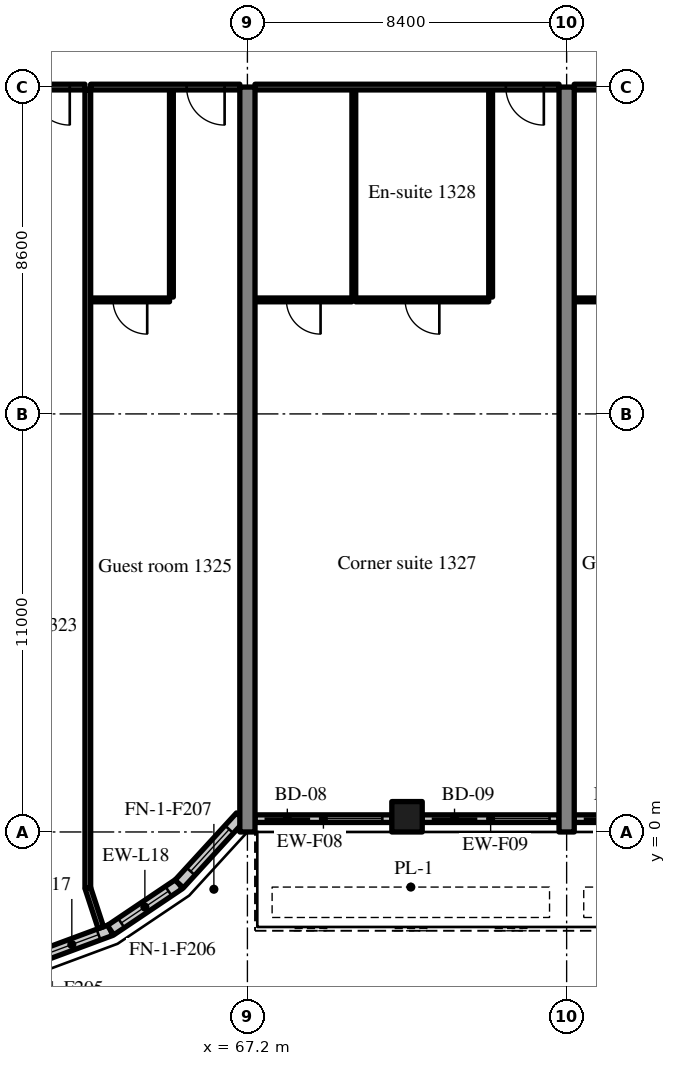
"""IFC4 building model, lengths in metres.
Left out: names, types, materials, properties, quantities, classifications, styles, units other than length and angle.
Written with IfcOpenShell. Run it as: python <this file> out.ifc"""

import sys

from ifc_helpers import new_model, si_unit, direction, frame, frame_2d, origin, origin_2d, place, context, subcontext, project, spatial, rectangle, extrude, source, transform, mapped, element, fill, save


model = new_model("IFC4")
c1 = context("Model", 3, precision=1e-05, world=origin(), true_north=direction((0.0, 1.0)))
c2 = subcontext(c1, "Body", "Model", "MODEL_VIEW")
j1 = project(units=[si_unit("LENGTHUNIT", "METRE"), si_unit("PLANEANGLEUNIT", "RADIAN")], contexts=[c1])
p1 = place(None, origin())
s1 = spatial("IfcSite", under=j1, at=p1, CompositionType="ELEMENT")
p2 = place(p1, origin())
s2 = spatial("IfcBuilding", under=s1, at=p2, CompositionType="ELEMENT")
p3 = place(p2, frame((0.0, 0.0, 58.2)))
s3 = spatial("IfcBuildingStorey", under=s2, at=p3, CompositionType="ELEMENT", Elevation=58.2)
m1 = source(origin(), c2, "Body", "SweptSolid", [
    extrude(rectangle(XDim=19.6, YDim=0.4, at=frame_2d((9.8, 0.0))), origin(), (0.0, 0.0, 1.0), 3.52),
])
for number, where, z_axis, x_axis in (
    (1, (67.2, 0.0, 0.0), (0.0, 0.0, 1.0), (0.0, 1.0, 0.0)),
    (2, (75.6, 0.0, 0.0), (0.0, 0.0, 1.0), (0.0, 1.0, 0.0)),
):
    element("IfcWall", number, at=place(p3, frame(where, z_axis=z_axis, x_axis=x_axis)), inside=s3, PredefinedType="SHEAR", context=c2, shape_type="MappedRepresentation", body=[
        mapped(m1, transform((0.0, 0.0, 0.0), scale=1.0)),
    ])
m2 = source(origin(), c2, "Body", "SweptSolid", [
    extrude(rectangle(XDim=0.8, YDim=0.8, at=origin_2d()), origin(), (0.0, 0.0, 1.0), 3.52),
])
p4 = place(p3, frame((71.4, 0.4, 0.0), z_axis=(0.0, 0.0, 1.0), x_axis=(1.0, 0.0, 0.0)))
e3 = element("IfcColumn", 3, at=p4, inside=s3, PredefinedType="COLUMN", context=c2, shape_type="MappedRepresentation", body=[
    mapped(m2, transform((0.0, 0.0, 0.0), scale=1.0)),
])
m3 = source(origin(), c2, "Body", "SweptSolid", [
    extrude(rectangle(XDim=2.176, YDim=0.3, at=frame_2d((1.088, 0.0))), origin(), (0.0, 0.0, 1.0), 3.52),
])
p5 = place(p3, frame((61.56, -3.34, 0.0), z_axis=(0.0, 0.0, 1.0), x_axis=(0.937531979054, 0.347899106424, 0.0)))
e4 = element("IfcWall", 4, at=p5, inside=s3, PredefinedType="SOLIDWALL", context=c2, shape_type="MappedRepresentation", body=[
    mapped(m3, transform((0.0, 0.0, 0.0), scale=1.0)),
])
m4 = source(origin(), c2, "Body", "SweptSolid", [
    extrude(rectangle(XDim=1.5, YDim=2.0, at=frame_2d((0.75, 1.0))), frame((0.0, 0.16, 0.0), z_axis=(0.0, -1.0, 0.0), x_axis=(1.0, 0.0, 0.0)), (0.0, 0.0, 1.0), 0.32),
])
p6 = place(p5, frame((0.338, 0.0, 0.9)))
e5 = element("IfcOpeningElement", 5, at=p6, cuts=e4, PredefinedType="OPENING", context=c2, shape_type="MappedRepresentation", body=[
    mapped(m4, transform((0.0, 0.0, 0.0), scale=1.0)),
])
m5 = source(origin(), c2, "Body", "SweptSolid", [
    extrude(rectangle(XDim=2.176, YDim=0.3, at=frame_2d((1.088, 0.0))), origin(), (0.0, 0.0, 1.0), 3.52),
])
p7 = place(p3, frame((63.599, -2.583, 0.0), z_axis=(0.0, 0.0, 1.0), x_axis=(0.829625727223, 0.558319937607, 0.0)))
e6 = element("IfcWall", 6, at=p7, inside=s3, PredefinedType="SOLIDWALL", context=c2, shape_type="MappedRepresentation", body=[
    mapped(m5, transform((0.0, 0.0, 0.0), scale=1.0)),
])
p8 = place(p7, frame((0.338, 0.0, 0.9)))
e7 = element("IfcOpeningElement", 7, at=p8, cuts=e6, PredefinedType="OPENING", context=c2, shape_type="MappedRepresentation", body=[
    mapped(m4, transform((0.0, 0.0, 0.0), scale=1.0)),
])
m6 = source(origin(), c2, "Body", "SweptSolid", [
    extrude(rectangle(XDim=2.398, YDim=0.3, at=frame_2d((1.199, 0.0))), origin(), (0.0, 0.0, 1.0), 3.52),
])
p9 = place(p3, frame((65.404, -1.369, 0.0), z_axis=(0.0, 0.0, 1.0), x_axis=(0.675374189419, 0.737475222815, 0.0)))
e8 = element("IfcWall", 8, at=p9, inside=s3, PredefinedType="SOLIDWALL", context=c2, shape_type="MappedRepresentation", body=[
    mapped(m6, transform((0.0, 0.0, 0.0), scale=1.0)),
])
p10 = place(p9, frame((0.449, 0.0, 0.9)))
e9 = element("IfcOpeningElement", 9, at=p10, cuts=e8, PredefinedType="OPENING", context=c2, shape_type="MappedRepresentation", body=[
    mapped(m4, transform((0.0, 0.0, 0.0), scale=1.0)),
])
m7 = source(origin(), c2, "Body", "SweptSolid", [
    extrude(rectangle(XDim=3.6, YDim=0.2, at=frame_2d((1.8, 0.0))), origin(), (0.0, 0.0, 1.0), 2.82),
])
p11 = place(p3, frame((67.4, 0.35, 0.0), z_axis=(0.0, 0.0, 1.0), x_axis=(1.0, 0.0, 0.0)))
e10 = element("IfcWall", 10, at=p11, inside=s3, PredefinedType="SOLIDWALL", context=c2, shape_type="MappedRepresentation", body=[
    mapped(m7, transform((0.0, 0.0, 0.0), scale=1.0)),
])
m8 = source(origin(), c2, "Body", "SweptSolid", [
    extrude(rectangle(XDim=1.2, YDim=2.4, at=frame_2d((0.6, 1.2))), frame((0.0, 0.11, 0.0), z_axis=(0.0, -1.0, 0.0), x_axis=(1.0, 0.0, 0.0)), (0.0, 0.0, 1.0), 0.22),
])
p12 = place(p11, frame((0.25, 0.0, 0.0)))
e11 = element("IfcOpeningElement", 11, at=p12, cuts=e10, PredefinedType="OPENING", context=c2, shape_type="MappedRepresentation", body=[
    mapped(m8, transform((0.0, 0.0, 0.0), scale=1.0)),
])
m9 = source(origin(), c2, "Body", "SweptSolid", [
    extrude(rectangle(XDim=1.5, YDim=1.5, at=frame_2d((0.75, 0.75))), frame((0.0, 0.11, 0.0), z_axis=(0.0, -1.0, 0.0), x_axis=(1.0, 0.0, 0.0)), (0.0, 0.0, 1.0), 0.22),
])
p13 = place(p11, frame((1.85, 0.0, 0.9)))
e12 = element("IfcOpeningElement", 12, at=p13, cuts=e10, PredefinedType="OPENING", context=c2, shape_type="MappedRepresentation", body=[
    mapped(m9, transform((0.0, 0.0, 0.0), scale=1.0)),
])
m10 = source(origin(), c2, "Body", "SweptSolid", [
    extrude(rectangle(XDim=3.6, YDim=0.2, at=frame_2d((1.8, 0.0))), origin(), (0.0, 0.0, 1.0), 2.82),
])
p14 = place(p3, frame((71.8, 0.35, 0.0), z_axis=(0.0, 0.0, 1.0), x_axis=(1.0, 0.0, 0.0)))
e13 = element("IfcWall", 13, at=p14, inside=s3, PredefinedType="SOLIDWALL", context=c2, shape_type="MappedRepresentation", body=[
    mapped(m10, transform((0.0, 0.0, 0.0), scale=1.0)),
])
p15 = place(p14, frame((0.25, 0.0, 0.0)))
e14 = element("IfcOpeningElement", 14, at=p15, cuts=e13, PredefinedType="OPENING", context=c2, shape_type="MappedRepresentation", body=[
    mapped(m8, transform((0.0, 0.0, 0.0), scale=1.0)),
])
p16 = place(p14, frame((1.85, 0.0, 0.9)))
e15 = element("IfcOpeningElement", 15, at=p16, cuts=e13, PredefinedType="OPENING", context=c2, shape_type="MappedRepresentation", body=[
    mapped(m9, transform((0.0, 0.0, 0.0), scale=1.0)),
])
p17 = place(p3, frame((75.8, 0.35, 0.0), z_axis=(0.0, 0.0, 1.0), x_axis=(1.0, 0.0, 0.0)))
e16 = element("IfcWall", 16, at=p17, inside=s3, PredefinedType="SOLIDWALL", context=c2, shape_type="MappedRepresentation", body=[
    mapped(m10, transform((0.0, 0.0, 0.0), scale=1.0)),
])
p18 = place(p17, frame((0.25, 0.0, 0.0)))
e17 = element("IfcOpeningElement", 17, at=p18, cuts=e16, PredefinedType="OPENING", context=c2, shape_type="MappedRepresentation", body=[
    mapped(m8, transform((0.0, 0.0, 0.0), scale=1.0)),
])
p19 = place(p17, frame((1.85, 0.0, 0.9)))
e18 = element("IfcOpeningElement", 18, at=p19, cuts=e16, PredefinedType="OPENING", context=c2, shape_type="MappedRepresentation", body=[
    mapped(m9, transform((0.0, 0.0, 0.0), scale=1.0)),
])
m11 = source(origin(), c2, "Body", "SweptSolid", [
    extrude(rectangle(XDim=3.925, YDim=0.15, at=frame_2d((1.962, 0.0))), origin(), (0.0, 0.0, 1.0), 2.82),
])
p20 = place(p3, frame((59.0, 19.6, 0.0), z_axis=(0.0, 0.0, 1.0), x_axis=(1.0, 0.0, 0.0)))
e19 = element("IfcWall", 19, at=p20, inside=s3, PredefinedType="PARTITIONING", context=c2, shape_type="MappedRepresentation", body=[
    mapped(m11, transform((0.0, 0.0, 0.0), scale=1.0)),
])
m12 = source(origin(), c2, "Body", "SweptSolid", [
    extrude(rectangle(XDim=1.0, YDim=2.1, at=frame_2d((0.5, 1.05))), frame((0.0, 0.085, 0.0), z_axis=(0.0, -1.0, 0.0), x_axis=(1.0, 0.0, 0.0)), (0.0, 0.0, 1.0), 0.17),
])
p21 = place(p20, frame((2.525, 0.0, 0.0)))
e20 = element("IfcOpeningElement", 20, at=p21, cuts=e19, PredefinedType="OPENING", context=c2, shape_type="MappedRepresentation", body=[
    mapped(m12, transform((0.0, 0.0, 0.0), scale=1.0)),
])
m13 = source(origin(), c2, "Body", "SweptSolid", [
    extrude(rectangle(XDim=5.45, YDim=0.1, at=frame_2d((2.725, 0.0))), origin(), (0.0, 0.0, 1.0), 3.52),
])
p22 = place(p3, frame((65.2, 14.075, 0.0), z_axis=(0.0, 0.0, 1.0), x_axis=(0.0, 1.0, 0.0)))
e21 = element("IfcWall", 21, at=p22, inside=s3, PredefinedType="PARTITIONING", context=c2, shape_type="MappedRepresentation", body=[
    mapped(m13, transform((0.0, 0.0, 0.0), scale=1.0)),
])
m14 = source(origin(), c2, "Body", "SweptSolid", [
    extrude(rectangle(XDim=2.075, YDim=0.1, at=frame_2d((1.038, 0.0))), origin(), (0.0, 0.0, 1.0), 3.52),
])
p23 = place(p3, frame((63.075, 14.0, 0.0), z_axis=(0.0, 0.0, 1.0), x_axis=(1.0, 0.0, 0.0)))
e22 = element("IfcWall", 22, at=p23, inside=s3, PredefinedType="PARTITIONING", context=c2, shape_type="MappedRepresentation", body=[
    mapped(m14, transform((0.0, 0.0, 0.0), scale=1.0)),
])
m15 = source(origin(), c2, "Body", "SweptSolid", [
    extrude(rectangle(XDim=0.9, YDim=2.1, at=frame_2d((0.45, 1.05))), frame((0.0, 0.06, 0.0), z_axis=(0.0, -1.0, 0.0), x_axis=(1.0, 0.0, 0.0)), (0.0, 0.0, 1.0), 0.12),
])
p24 = place(p23, frame((0.588, 0.0, 0.0)))
e23 = element("IfcOpeningElement", 23, at=p24, cuts=e22, PredefinedType="OPENING", context=c2, shape_type="MappedRepresentation", body=[
    mapped(m15, transform((0.0, 0.0, 0.0), scale=1.0)),
])
p25 = place(p3, frame((63.075, 19.6, 0.0), z_axis=(0.0, 0.0, 1.0), x_axis=(1.0, 0.0, 0.0)))
e24 = element("IfcWall", 24, at=p25, inside=s3, PredefinedType="PARTITIONING", context=c2, shape_type="MappedRepresentation", body=[
    mapped(m11, transform((0.0, 0.0, 0.0), scale=1.0)),
])
p26 = place(p25, frame((2.525, 0.0, 0.0)))
e25 = element("IfcOpeningElement", 25, at=p26, cuts=e24, PredefinedType="OPENING", context=c2, shape_type="MappedRepresentation", body=[
    mapped(m12, transform((0.0, 0.0, 0.0), scale=1.0)),
])
m16 = source(origin(), c2, "Body", "SweptSolid", [
    extrude(rectangle(XDim=20.998, YDim=0.15, at=frame_2d((10.499, 0.0))), origin(), (0.0, 0.0, 1.0), 3.52),
])
p27 = place(p3, frame((63.0, -1.473, 0.0), z_axis=(0.0, 0.0, 1.0), x_axis=(0.0, 1.0, 0.0)))
e26 = element("IfcWall", 26, at=p27, inside=s3, PredefinedType="PARTITIONING", context=c2, shape_type="MappedRepresentation", body=[
    mapped(m16, transform((0.0, 0.0, 0.0), scale=1.0)),
])
for number, where, z_axis, x_axis in (
    (27, (73.6, 14.075, 0.0), (0.0, 0.0, 1.0), (0.0, 1.0, 0.0)),
    (28, (70.0, 14.075, 0.0), (0.0, 0.0, 1.0), (0.0, 1.0, 0.0)),
):
    element("IfcWall", number, at=place(p3, frame(where, z_axis=z_axis, x_axis=x_axis)), inside=s3, PredefinedType="PARTITIONING", context=c2, shape_type="MappedRepresentation", body=[
        mapped(m13, transform((0.0, 0.0, 0.0), scale=1.0)),
    ])
m17 = source(origin(), c2, "Body", "SweptSolid", [
    extrude(rectangle(XDim=3.5, YDim=0.1, at=frame_2d((1.75, 0.0))), origin(), (0.0, 0.0, 1.0), 3.52),
])
p28 = place(p3, frame((70.05, 14.0, 0.0), z_axis=(0.0, 0.0, 1.0), x_axis=(1.0, 0.0, 0.0)))
e29 = element("IfcWall", 29, at=p28, inside=s3, PredefinedType="PARTITIONING", context=c2, shape_type="MappedRepresentation", body=[
    mapped(m17, transform((0.0, 0.0, 0.0), scale=1.0)),
])
p29 = place(p28, frame((1.3, 0.0, 0.0)))
e30 = element("IfcOpeningElement", 30, at=p29, cuts=e29, PredefinedType="OPENING", context=c2, shape_type="MappedRepresentation", body=[
    mapped(m15, transform((0.0, 0.0, 0.0), scale=1.0)),
])
m18 = source(origin(), c2, "Body", "SweptSolid", [
    extrude(rectangle(XDim=2.55, YDim=0.1, at=frame_2d((1.275, 0.0))), origin(), (0.0, 0.0, 1.0), 3.52),
])
p30 = place(p3, frame((67.4, 14.0, 0.0), z_axis=(0.0, 0.0, 1.0), x_axis=(1.0, 0.0, 0.0)))
e31 = element("IfcWall", 31, at=p30, inside=s3, PredefinedType="PARTITIONING", context=c2, shape_type="MappedRepresentation", body=[
    mapped(m18, transform((0.0, 0.0, 0.0), scale=1.0)),
])
p31 = place(p30, frame((0.825, 0.0, 0.0)))
e32 = element("IfcOpeningElement", 32, at=p31, cuts=e31, PredefinedType="OPENING", context=c2, shape_type="MappedRepresentation", body=[
    mapped(m15, transform((0.0, 0.0, 0.0), scale=1.0)),
])
m19 = source(origin(), c2, "Body", "SweptSolid", [
    extrude(rectangle(XDim=8.0, YDim=0.15, at=frame_2d((4.0, 0.0))), origin(), (0.0, 0.0, 1.0), 2.82),
])
p32 = place(p3, frame((67.4, 19.6, 0.0), z_axis=(0.0, 0.0, 1.0), x_axis=(1.0, 0.0, 0.0)))
e33 = element("IfcWall", 33, at=p32, inside=s3, PredefinedType="PARTITIONING", context=c2, shape_type="MappedRepresentation", body=[
    mapped(m19, transform((0.0, 0.0, 0.0), scale=1.0)),
])
p33 = place(p32, frame((6.6, 0.0, 0.0)))
e34 = element("IfcOpeningElement", 34, at=p33, cuts=e33, PredefinedType="OPENING", context=c2, shape_type="MappedRepresentation", body=[
    mapped(m12, transform((0.0, 0.0, 0.0), scale=1.0)),
])
p34 = place(p3, frame((75.8, 14.0, 0.0), z_axis=(0.0, 0.0, 1.0), x_axis=(1.0, 0.0, 0.0)))
e35 = element("IfcWall", 35, at=p34, inside=s3, PredefinedType="PARTITIONING", context=c2, shape_type="MappedRepresentation", body=[
    mapped(m14, transform((0.0, 0.0, 0.0), scale=1.0)),
])
p35 = place(p34, frame((0.588, 0.0, 0.0)))
e36 = element("IfcOpeningElement", 36, at=p35, cuts=e35, PredefinedType="OPENING", context=c2, shape_type="MappedRepresentation", body=[
    mapped(m15, transform((0.0, 0.0, 0.0), scale=1.0)),
])
p36 = place(p3, frame((75.8, 19.6, 0.0), z_axis=(0.0, 0.0, 1.0), x_axis=(1.0, 0.0, 0.0)))
e37 = element("IfcWall", 37, at=p36, inside=s3, PredefinedType="PARTITIONING", context=c2, shape_type="MappedRepresentation", body=[
    mapped(m11, transform((0.0, 0.0, 0.0), scale=1.0)),
])
p37 = place(p36, frame((2.525, 0.0, 0.0)))
e38 = element("IfcOpeningElement", 38, at=p37, cuts=e37, PredefinedType="OPENING", context=c2, shape_type="MappedRepresentation", body=[
    mapped(m12, transform((0.0, 0.0, 0.0), scale=1.0)),
])
m20 = source(origin(), c2, "Body", "SweptSolid", [
    extrude(rectangle(XDim=1.101, YDim=0.15, at=frame_2d((0.55, 0.0))), origin(), (0.0, 0.0, 1.0), 3.52),
])
p38 = place(p3, frame((63.343, -2.519, 0.0), z_axis=(0.0, 0.0, 1.0), x_axis=(-0.311567081539, 0.950224159712, 0.0)))
e39 = element("IfcWall", 39, at=p38, inside=s3, PredefinedType="PARTITIONING", context=c2, shape_type="MappedRepresentation", body=[
    mapped(m20, transform((0.0, 0.0, 0.0), scale=1.0)),
])
m21 = source(origin(), c2, "Body", "SweptSolid", [
    extrude(rectangle(XDim=1.5, YDim=2.0, at=frame_2d((0.75, 1.0))), frame((0.0, 0.03, 0.0), z_axis=(0.0, -1.0, 0.0), x_axis=(1.0, 0.0, 0.0)), (0.0, 0.0, 1.0), 0.06),
])
p39 = place(p6, origin())
e40 = element("IfcWindow", 40, at=p39, inside=s3, PartitioningType="SINGLE_PANEL", PredefinedType="WINDOW", context=c2, shape_type="MappedRepresentation", body=[
    mapped(m21, transform((0.0, 0.0, 0.0), scale=1.0)),
])
fill(e5, e40)
p40 = place(p8, origin())
e41 = element("IfcWindow", 41, at=p40, inside=s3, PartitioningType="SINGLE_PANEL", PredefinedType="WINDOW", context=c2, shape_type="MappedRepresentation", body=[
    mapped(m21, transform((0.0, 0.0, 0.0), scale=1.0)),
])
fill(e7, e41)
p41 = place(p10, origin())
e42 = element("IfcWindow", 42, at=p41, inside=s3, PartitioningType="SINGLE_PANEL", PredefinedType="WINDOW", context=c2, shape_type="MappedRepresentation", body=[
    mapped(m21, transform((0.0, 0.0, 0.0), scale=1.0)),
])
fill(e9, e42)
m22 = source(origin(), c2, "Body", "SweptSolid", [
    extrude(rectangle(XDim=1.2, YDim=2.4, at=frame_2d((0.6, 1.2))), frame((0.0, 0.025, 0.0), z_axis=(0.0, -1.0, 0.0), x_axis=(1.0, 0.0, 0.0)), (0.0, 0.0, 1.0), 0.05),
])
p42 = place(p12, origin())
e43 = element("IfcDoor", 43, at=p42, inside=s3, OperationType="SLIDING_TO_RIGHT", PredefinedType="DOOR", context=c2, shape_type="MappedRepresentation", body=[
    mapped(m22, transform((0.0, 0.0, 0.0), scale=1.0)),
])
fill(e11, e43)
m23 = source(origin(), c2, "Body", "SweptSolid", [
    extrude(rectangle(XDim=1.5, YDim=1.5, at=frame_2d((0.75, 0.75))), frame((0.0, 0.03, 0.0), z_axis=(0.0, -1.0, 0.0), x_axis=(1.0, 0.0, 0.0)), (0.0, 0.0, 1.0), 0.06),
])
p43 = place(p13, origin())
e44 = element("IfcWindow", 44, at=p43, inside=s3, PartitioningType="SINGLE_PANEL", PredefinedType="WINDOW", context=c2, shape_type="MappedRepresentation", body=[
    mapped(m23, transform((0.0, 0.0, 0.0), scale=1.0)),
])
fill(e12, e44)
p44 = place(p15, origin())
e45 = element("IfcDoor", 45, at=p44, inside=s3, OperationType="SLIDING_TO_LEFT", PredefinedType="DOOR", context=c2, shape_type="MappedRepresentation", body=[
    mapped(m22, transform((0.0, 0.0, 0.0), scale=1.0)),
])
fill(e14, e45)
p45 = place(p16, origin())
e46 = element("IfcWindow", 46, at=p45, inside=s3, PartitioningType="SINGLE_PANEL", PredefinedType="WINDOW", context=c2, shape_type="MappedRepresentation", body=[
    mapped(m23, transform((0.0, 0.0, 0.0), scale=1.0)),
])
fill(e15, e46)
p46 = place(p18, origin())
e47 = element("IfcDoor", 47, at=p46, inside=s3, OperationType="SLIDING_TO_RIGHT", PredefinedType="DOOR", context=c2, shape_type="MappedRepresentation", body=[
    mapped(m22, transform((0.0, 0.0, 0.0), scale=1.0)),
])
fill(e17, e47)
m24 = source(origin(), c2, "Body", "SweptSolid", [
    extrude(rectangle(XDim=1.0, YDim=2.1, at=frame_2d((0.5, 1.05))), frame((0.0, 0.025, 0.0), z_axis=(0.0, -1.0, 0.0), x_axis=(1.0, 0.0, 0.0)), (0.0, 0.0, 1.0), 0.05),
])
p47 = place(p21, origin())
e48 = element("IfcDoor", 48, at=p47, inside=s3, OperationType="SINGLE_SWING_RIGHT", PredefinedType="DOOR", context=c2, shape_type="MappedRepresentation", body=[
    mapped(m24, transform((0.0, 0.0, 0.0), scale=1.0)),
])
fill(e20, e48)
m25 = source(origin(), c2, "Body", "SweptSolid", [
    extrude(rectangle(XDim=0.9, YDim=2.1, at=frame_2d((0.45, 1.05))), frame((0.0, 0.025, 0.0), z_axis=(0.0, -1.0, 0.0), x_axis=(1.0, 0.0, 0.0)), (0.0, 0.0, 1.0), 0.05),
])
p48 = place(p24, origin())
e49 = element("IfcDoor", 49, at=p48, inside=s3, OperationType="SINGLE_SWING_RIGHT", PredefinedType="DOOR", context=c2, shape_type="MappedRepresentation", body=[
    mapped(m25, transform((0.0, 0.0, 0.0), scale=1.0)),
])
fill(e23, e49)
p49 = place(p26, origin())
e50 = element("IfcDoor", 50, at=p49, inside=s3, OperationType="SINGLE_SWING_RIGHT", PredefinedType="DOOR", context=c2, shape_type="MappedRepresentation", body=[
    mapped(m24, transform((0.0, 0.0, 0.0), scale=1.0)),
])
fill(e25, e50)
p50 = place(p29, origin())
e51 = element("IfcDoor", 51, at=p50, inside=s3, OperationType="SINGLE_SWING_RIGHT", PredefinedType="DOOR", context=c2, shape_type="MappedRepresentation", body=[
    mapped(m25, transform((0.0, 0.0, 0.0), scale=1.0)),
])
fill(e30, e51)
p51 = place(p31, origin())
e52 = element("IfcDoor", 52, at=p51, inside=s3, OperationType="SINGLE_SWING_RIGHT", PredefinedType="DOOR", context=c2, shape_type="MappedRepresentation", body=[
    mapped(m25, transform((0.0, 0.0, 0.0), scale=1.0)),
])
fill(e32, e52)
p52 = place(p33, origin())
e53 = element("IfcDoor", 53, at=p52, inside=s3, OperationType="SINGLE_SWING_RIGHT", PredefinedType="DOOR", context=c2, shape_type="MappedRepresentation", body=[
    mapped(m24, transform((0.0, 0.0, 0.0), scale=1.0)),
])
fill(e34, e53)
p53 = place(p35, origin())
e54 = element("IfcDoor", 54, at=p53, inside=s3, OperationType="SINGLE_SWING_RIGHT", PredefinedType="DOOR", context=c2, shape_type="MappedRepresentation", body=[
    mapped(m25, transform((0.0, 0.0, 0.0), scale=1.0)),
])
fill(e36, e54)
save(model, sys.argv[1])
